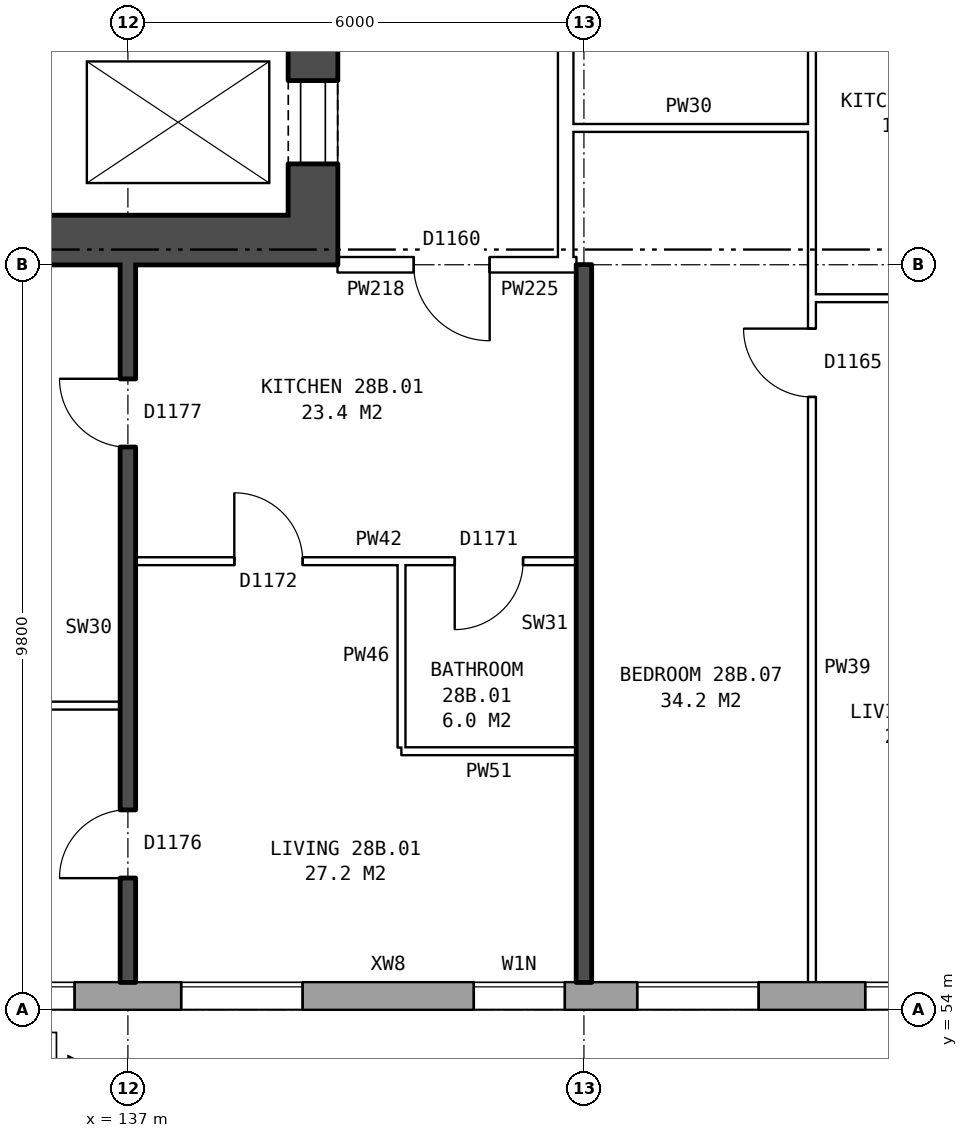
"""IFC4 building model, lengths in metres.
Left out: names, types, materials, properties, quantities, classifications, styles, units other than length and angle.
Written with IfcOpenShell. Run it as: python <this file> out.ifc"""

import sys

from ifc_helpers import new_model, si_unit, direction, frame, frame_2d, origin, place, context, subcontext, project, spatial, rectangle, extrude, element, fill, save


model = new_model("IFC4")
c1 = context("Model", 3, precision=1e-05, world=origin(), true_north=direction((0.0, 1.0)))
c2 = subcontext(c1, "Body", "Model", "MODEL_VIEW")
j1 = project(units=[si_unit("LENGTHUNIT", "METRE"), si_unit("PLANEANGLEUNIT", "RADIAN")], contexts=[c1])
p1 = place(None, origin())
s1 = spatial("IfcSite", under=j1, at=p1, CompositionType="ELEMENT")
p2 = place(p1, origin())
s2 = spatial("IfcBuilding", under=s1, at=p2, CompositionType="ELEMENT")
p3 = place(p2, frame((0.0, 0.0, 102.6)))
s3 = spatial("IfcBuildingStorey", under=s2, at=p3, CompositionType="ELEMENT", Elevation=102.6)
p4 = place(p3, frame((134.075, 54.18, 0.0), z_axis=(0.0, 0.0, 1.0), x_axis=(1.0, 0.0, 0.0)))
e1 = element("IfcWall", 1, at=p4, inside=s3, PredefinedType="STANDARD", context=c2, shape_type="SweptSolid", body=[
    extrude(rectangle(XDim=36.851, YDim=0.36, at=frame_2d((18.425, 0.0))), origin(), (0.0, 0.0, 1.0), 2.85),
])
p5 = place(p4, frame((0.625, 0.0, 0.8)))
e2 = element("IfcOpeningElement", 2, at=p5, cuts=e1, PredefinedType="OPENING", context=c2, shape_type="SweptSolid", body=[
    extrude(rectangle(XDim=1.6, YDim=1.8, at=frame_2d((0.8, 0.9))), frame((0.0, 0.19, 0.0), z_axis=(0.0, -1.0, 0.0), x_axis=(1.0, 0.0, 0.0)), (0.0, 0.0, 1.0), 0.38),
])
p6 = place(p4, frame((3.625, 0.0, 0.8)))
e3 = element("IfcOpeningElement", 3, at=p6, cuts=e1, PredefinedType="OPENING", context=c2, shape_type="SweptSolid", body=[
    extrude(rectangle(XDim=1.6, YDim=1.8, at=frame_2d((0.8, 0.9))), frame((0.0, 0.19, 0.0), z_axis=(0.0, -1.0, 0.0), x_axis=(1.0, 0.0, 0.0)), (0.0, 0.0, 1.0), 0.38),
])
p7 = place(p4, frame((7.475, 0.0, 0.8)))
e4 = element("IfcOpeningElement", 4, at=p7, cuts=e1, PredefinedType="OPENING", context=c2, shape_type="SweptSolid", body=[
    extrude(rectangle(XDim=1.2, YDim=1.2, at=frame_2d((0.6, 0.6))), frame((0.0, 0.19, 0.0), z_axis=(0.0, -1.0, 0.0), x_axis=(1.0, 0.0, 0.0)), (0.0, 0.0, 1.0), 0.38),
])
p8 = place(p4, frame((9.625, 0.0, 0.8)))
e5 = element("IfcOpeningElement", 5, at=p8, cuts=e1, PredefinedType="OPENING", context=c2, shape_type="SweptSolid", body=[
    extrude(rectangle(XDim=1.6, YDim=1.8, at=frame_2d((0.8, 0.9))), frame((0.0, 0.19, 0.0), z_axis=(0.0, -1.0, 0.0), x_axis=(1.0, 0.0, 0.0)), (0.0, 0.0, 1.0), 0.38),
])
p9 = place(p4, frame((12.625, 0.0, 0.8)))
e6 = element("IfcOpeningElement", 6, at=p9, cuts=e1, PredefinedType="OPENING", context=c2, shape_type="SweptSolid", body=[
    extrude(rectangle(XDim=1.6, YDim=1.8, at=frame_2d((0.8, 0.9))), frame((0.0, 0.19, 0.0), z_axis=(0.0, -1.0, 0.0), x_axis=(1.0, 0.0, 0.0)), (0.0, 0.0, 1.0), 0.38),
])
p10 = place(p4, frame((15.625, 0.0, 0.8)))
e7 = element("IfcOpeningElement", 7, at=p10, cuts=e1, PredefinedType="OPENING", context=c2, shape_type="SweptSolid", body=[
    extrude(rectangle(XDim=1.6, YDim=1.8, at=frame_2d((0.8, 0.9))), frame((0.0, 0.19, 0.0), z_axis=(0.0, -1.0, 0.0), x_axis=(1.0, 0.0, 0.0)), (0.0, 0.0, 1.0), 0.38),
])
p11 = place(p4, frame((18.625, 0.0, 0.8)))
e8 = element("IfcOpeningElement", 8, at=p11, cuts=e1, PredefinedType="OPENING", context=c2, shape_type="SweptSolid", body=[
    extrude(rectangle(XDim=1.6, YDim=1.8, at=frame_2d((0.8, 0.9))), frame((0.0, 0.19, 0.0), z_axis=(0.0, -1.0, 0.0), x_axis=(1.0, 0.0, 0.0)), (0.0, 0.0, 1.0), 0.38),
])
p12 = place(p4, frame((21.625, 0.0, 0.8)))
e9 = element("IfcOpeningElement", 9, at=p12, cuts=e1, PredefinedType="OPENING", context=c2, shape_type="SweptSolid", body=[
    extrude(rectangle(XDim=1.6, YDim=1.8, at=frame_2d((0.8, 0.9))), frame((0.0, 0.19, 0.0), z_axis=(0.0, -1.0, 0.0), x_axis=(1.0, 0.0, 0.0)), (0.0, 0.0, 1.0), 0.38),
])
p13 = place(p4, frame((24.625, 0.0, 0.8)))
e10 = element("IfcOpeningElement", 10, at=p13, cuts=e1, PredefinedType="OPENING", context=c2, shape_type="SweptSolid", body=[
    extrude(rectangle(XDim=1.6, YDim=1.8, at=frame_2d((0.8, 0.9))), frame((0.0, 0.19, 0.0), z_axis=(0.0, -1.0, 0.0), x_axis=(1.0, 0.0, 0.0)), (0.0, 0.0, 1.0), 0.38),
])
p14 = place(p4, frame((27.125, 0.0, 0.8)))
e11 = element("IfcOpeningElement", 11, at=p14, cuts=e1, PredefinedType="OPENING", context=c2, shape_type="SweptSolid", body=[
    extrude(rectangle(XDim=1.4, YDim=1.8, at=frame_2d((0.7, 0.9))), frame((0.0, 0.19, 0.0), z_axis=(0.0, -1.0, 0.0), x_axis=(1.0, 0.0, 0.0)), (0.0, 0.0, 1.0), 0.38),
])
p15 = place(p4, frame((28.825, 0.0, 0.8)))
e12 = element("IfcOpeningElement", 12, at=p15, cuts=e1, PredefinedType="OPENING", context=c2, shape_type="SweptSolid", body=[
    extrude(rectangle(XDim=0.8, YDim=0.9, at=frame_2d((0.4, 0.45))), frame((0.0, 0.19, 0.0), z_axis=(0.0, -1.0, 0.0), x_axis=(1.0, 0.0, 0.0)), (0.0, 0.0, 1.0), 0.38),
])
p16 = place(p4, frame((33.625, 0.0, 0.8)))
e13 = element("IfcOpeningElement", 13, at=p16, cuts=e1, PredefinedType="OPENING", context=c2, shape_type="SweptSolid", body=[
    extrude(rectangle(XDim=1.6, YDim=1.8, at=frame_2d((0.8, 0.9))), frame((0.0, 0.19, 0.0), z_axis=(0.0, -1.0, 0.0), x_axis=(1.0, 0.0, 0.0)), (0.0, 0.0, 1.0), 0.38),
])
p17 = place(p4, frame((30.825, 0.0, 1.7)))
e14 = element("IfcOpeningElement", 14, at=p17, cuts=e1, PredefinedType="OPENING", context=c2, shape_type="SweptSolid", body=[
    extrude(rectangle(XDim=0.8, YDim=0.9, at=frame_2d((0.4, 0.45))), frame((0.0, 0.19, 0.0), z_axis=(0.0, -1.0, 0.0), x_axis=(1.0, 0.0, 0.0)), (0.0, 0.0, 1.0), 0.38),
])
p18 = place(p4, frame((31.925, 0.0, 0.8)))
e15 = element("IfcOpeningElement", 15, at=p18, cuts=e1, PredefinedType="OPENING", context=c2, shape_type="SweptSolid", body=[
    extrude(rectangle(XDim=0.8, YDim=1.8, at=frame_2d((0.4, 0.9))), frame((0.0, 0.19, 0.0), z_axis=(0.0, -1.0, 0.0), x_axis=(1.0, 0.0, 0.0)), (0.0, 0.0, 1.0), 0.38),
])
p19 = place(p3, frame((139.435, 64.45, 0.0), z_axis=(0.0, 0.0, 1.0), x_axis=(0.0, 1.0, 0.0)))
e16 = element("IfcWall", 16, at=p19, inside=s3, PredefinedType="SHEAR", context=c2, shape_type="SweptSolid", body=[
    extrude(rectangle(XDim=11.1, YDim=0.65, at=frame_2d((5.55, 0.0))), origin(), (0.0, 0.0, 1.0), 2.85),
])
p20 = place(p19, frame((0.675, 0.0, 0.0)))
e17 = element("IfcOpeningElement", 17, at=p20, cuts=e16, PredefinedType="OPENING", context=c2, shape_type="SweptSolid", body=[
    extrude(rectangle(XDim=1.1, YDim=2.1, at=frame_2d((0.55, 1.05))), frame((0.0, 0.335, 0.0), z_axis=(0.0, -1.0, 0.0), x_axis=(1.0, 0.0, 0.0)), (0.0, 0.0, 1.0), 0.67),
])
p21 = place(p19, frame((9.25, 0.0, 0.0)))
e18 = element("IfcOpeningElement", 18, at=p21, cuts=e16, PredefinedType="OPENING", context=c2, shape_type="SweptSolid", body=[
    extrude(rectangle(XDim=1.1, YDim=2.1, at=frame_2d((0.55, 1.05))), frame((0.0, 0.335, 0.0), z_axis=(0.0, -1.0, 0.0), x_axis=(1.0, 0.0, 0.0)), (0.0, 0.0, 1.0), 0.67),
])
p22 = place(p19, frame((7.475, 0.0, 0.0)))
e19 = element("IfcOpeningElement", 19, at=p22, cuts=e16, PredefinedType="OPENING", context=c2, shape_type="SweptSolid", body=[
    extrude(rectangle(XDim=0.85, YDim=2.1, at=frame_2d((0.425, 1.05))), frame((0.0, 0.335, 0.0), z_axis=(0.0, -1.0, 0.0), x_axis=(1.0, 0.0, 0.0)), (0.0, 0.0, 1.0), 0.67),
])
p23 = place(p3, frame((139.76, 64.125, 0.0), z_axis=(0.0, 0.0, 1.0), x_axis=(-1.0, 0.0, 0.0)))
e20 = element("IfcWall", 20, at=p23, inside=s3, PredefinedType="SHEAR", context=c2, shape_type="SweptSolid", body=[
    extrude(rectangle(XDim=8.4, YDim=0.65, at=frame_2d((4.2, 0.0))), origin(), (0.0, 0.0, 1.0), 2.85),
])
p24 = place(p3, frame((142.76, 63.9, 0.0), z_axis=(0.0, 0.0, 1.0), x_axis=(0.0, 1.0, 0.0)))
e21 = element("IfcWall", 21, at=p24, inside=s3, PredefinedType="PARTITIONING", context=c2, shape_type="SweptSolid", body=[
    extrude(rectangle(XDim=12.2, YDim=0.2, at=frame_2d((6.1, 0.0))), origin(), (0.0, 0.0, 1.0), 2.85),
])
p25 = place(p24, frame((5.1, 0.0, 0.0)))
e22 = element("IfcOpeningElement", 22, at=p25, cuts=e21, PredefinedType="OPENING", context=c2, shape_type="SweptSolid", body=[
    extrude(rectangle(XDim=2.0, YDim=2.1, at=frame_2d((1.0, 1.05))), frame((0.0, 0.11, 0.0), z_axis=(0.0, -1.0, 0.0), x_axis=(1.0, 0.0, 0.0)), (0.0, 0.0, 1.0), 0.22),
])
p26 = place(p3, frame((140.6, 57.4, 0.0), z_axis=(0.0, 0.0, 1.0), x_axis=(1.0, 0.0, 0.0)))
e23 = element("IfcWall", 23, at=p26, inside=s3, PredefinedType="PARTITIONING", context=c2, shape_type="SweptSolid", body=[
    extrude(rectangle(XDim=2.3, YDim=0.1, at=frame_2d((1.15, 0.0))), origin(), (0.0, 0.0, 1.0), 2.85),
])
p27 = place(p3, frame((131.36, 58.0, 0.0), z_axis=(0.0, 0.0, 1.0), x_axis=(1.0, 0.0, 0.0)))
e24 = element("IfcWall", 24, at=p27, inside=s3, PredefinedType="PARTITIONING", context=c2, shape_type="SweptSolid", body=[
    extrude(rectangle(XDim=5.54, YDim=0.1, at=frame_2d((2.77, 0.0))), origin(), (0.0, 0.0, 1.0), 2.85),
])
p28 = place(p3, frame((137.1, 59.9, 0.0), z_axis=(0.0, 0.0, 1.0), x_axis=(1.0, 0.0, 0.0)))
e25 = element("IfcWall", 25, at=p28, inside=s3, PredefinedType="PARTITIONING", context=c2, shape_type="SweptSolid", body=[
    extrude(rectangle(XDim=5.8, YDim=0.1, at=frame_2d((2.9, 0.0))), origin(), (0.0, 0.0, 1.0), 2.85),
])
p29 = place(p28, frame((1.3, 0.0, 0.0)))
e26 = element("IfcOpeningElement", 26, at=p29, cuts=e25, PredefinedType="OPENING", context=c2, shape_type="SweptSolid", body=[
    extrude(rectangle(XDim=0.9, YDim=2.1, at=frame_2d((0.45, 1.05))), frame((0.0, 0.06, 0.0), z_axis=(0.0, -1.0, 0.0), x_axis=(1.0, 0.0, 0.0)), (0.0, 0.0, 1.0), 0.12),
])
p30 = place(p28, frame((4.2, 0.0, 0.0)))
e27 = element("IfcOpeningElement", 27, at=p30, cuts=e25, PredefinedType="OPENING", context=c2, shape_type="SweptSolid", body=[
    extrude(rectangle(XDim=0.9, YDim=2.1, at=frame_2d((0.45, 1.05))), frame((0.0, 0.06, 0.0), z_axis=(0.0, -1.0, 0.0), x_axis=(1.0, 0.0, 0.0)), (0.0, 0.0, 1.0), 0.12),
])
p31 = place(p3, frame((146.0, 63.36, 0.0), z_axis=(0.0, 0.0, 1.0), x_axis=(1.0, 0.0, 0.0)))
e28 = element("IfcWall", 28, at=p31, inside=s3, PredefinedType="PARTITIONING", context=c2, shape_type="SweptSolid", body=[
    extrude(rectangle(XDim=6.0, YDim=0.1, at=frame_2d((3.0, 0.0))), origin(), (0.0, 0.0, 1.0), 2.85),
])
p32 = place(p31, frame((1.05, 0.0, 0.0)))
e29 = element("IfcOpeningElement", 29, at=p32, cuts=e28, PredefinedType="OPENING", context=c2, shape_type="SweptSolid", body=[
    extrude(rectangle(XDim=0.9, YDim=2.1, at=frame_2d((0.45, 1.05))), frame((0.0, 0.06, 0.0), z_axis=(0.0, -1.0, 0.0), x_axis=(1.0, 0.0, 0.0)), (0.0, 0.0, 1.0), 0.12),
])
p33 = place(p31, frame((4.05, 0.0, 0.0)))
e30 = element("IfcOpeningElement", 30, at=p33, cuts=e28, PredefinedType="OPENING", context=c2, shape_type="SweptSolid", body=[
    extrude(rectangle(XDim=0.9, YDim=2.1, at=frame_2d((0.45, 1.05))), frame((0.0, 0.06, 0.0), z_axis=(0.0, -1.0, 0.0), x_axis=(1.0, 0.0, 0.0)), (0.0, 0.0, 1.0), 0.12),
])
p34 = place(p3, frame((139.76, 63.8, 0.0), z_axis=(0.0, 0.0, 1.0), x_axis=(1.0, 0.0, 0.0)))
e31 = element("IfcWall", 31, at=p34, inside=s3, PredefinedType="PARTITIONING", context=c2, shape_type="SweptSolid", body=[
    extrude(rectangle(XDim=3.0, YDim=0.2, at=frame_2d((1.5, 0.0))), origin(), (0.0, 0.0, 1.0), 2.85),
])
p35 = place(p34, frame((1.0, 0.0, 0.0)))
e32 = element("IfcOpeningElement", 32, at=p35, cuts=e31, PredefinedType="OPENING", context=c2, shape_type="SweptSolid", body=[
    extrude(rectangle(XDim=1.0, YDim=2.1, at=frame_2d((0.5, 1.05))), frame((0.0, 0.11, 0.0), z_axis=(0.0, -1.0, 0.0), x_axis=(1.0, 0.0, 0.0)), (0.0, 0.0, 1.0), 0.22),
])
p36 = place(p3, frame((142.76, 63.8, 0.0), z_axis=(0.0, 0.0, 1.0), x_axis=(1.0, 0.0, 0.0)))
e33 = element("IfcWall", 33, at=p36, inside=s3, PredefinedType="PARTITIONING", context=c2, shape_type="SweptSolid", body=[
    extrude(rectangle(XDim=0.14, YDim=0.2, at=frame_2d((0.07, 0.0))), origin(), (0.0, 0.0, 1.0), 2.85),
])
p37 = place(p3, frame((142.76, 65.6, 0.0), z_axis=(0.0, 0.0, 1.0), x_axis=(1.0, 0.0, 0.0)))
e34 = element("IfcWall", 34, at=p37, inside=s3, PredefinedType="PARTITIONING", context=c2, shape_type="SweptSolid", body=[
    extrude(rectangle(XDim=3.24, YDim=0.1, at=frame_2d((1.62, 0.0))), origin(), (0.0, 0.0, 1.0), 2.85),
])
p38 = place(p3, frame((137.0, 54.36, 0.0), z_axis=(0.0, 0.0, 1.0), x_axis=(0.0, 1.0, 0.0)))
e35 = element("IfcWall", 35, at=p38, inside=s3, PredefinedType="SOLIDWALL", context=c2, shape_type="SweptSolid", body=[
    extrude(rectangle(XDim=9.44, YDim=0.2, at=frame_2d((4.72, 0.0))), origin(), (0.0, 0.0, 1.0), 2.85),
])
p39 = place(p38, frame((1.37, 0.0, 0.0)))
e36 = element("IfcOpeningElement", 36, at=p39, cuts=e35, PredefinedType="OPENING", context=c2, shape_type="SweptSolid", body=[
    extrude(rectangle(XDim=0.9, YDim=2.1, at=frame_2d((0.45, 1.05))), frame((0.0, 0.11, 0.0), z_axis=(0.0, -1.0, 0.0), x_axis=(1.0, 0.0, 0.0)), (0.0, 0.0, 1.0), 0.22),
])
p40 = place(p38, frame((7.04, 0.0, 0.0)))
e37 = element("IfcOpeningElement", 37, at=p40, cuts=e35, PredefinedType="OPENING", context=c2, shape_type="SweptSolid", body=[
    extrude(rectangle(XDim=0.9, YDim=2.1, at=frame_2d((0.45, 1.05))), frame((0.0, 0.11, 0.0), z_axis=(0.0, -1.0, 0.0), x_axis=(1.0, 0.0, 0.0)), (0.0, 0.0, 1.0), 0.22),
])
p41 = place(p3, frame((140.6, 57.45, 0.0), z_axis=(0.0, 0.0, 1.0), x_axis=(0.0, 1.0, 0.0)))
e38 = element("IfcWall", 38, at=p41, inside=s3, PredefinedType="PARTITIONING", context=c2, shape_type="SweptSolid", body=[
    extrude(rectangle(XDim=2.4, YDim=0.1, at=frame_2d((1.2, 0.0))), origin(), (0.0, 0.0, 1.0), 2.85),
])
p42 = place(p3, frame((143.0, 54.36, 0.0), z_axis=(0.0, 0.0, 1.0), x_axis=(0.0, 1.0, 0.0)))
e39 = element("IfcWall", 39, at=p42, inside=s3, PredefinedType="SOLIDWALL", context=c2, shape_type="SweptSolid", body=[
    extrude(rectangle(XDim=9.44, YDim=0.2, at=frame_2d((4.72, 0.0))), origin(), (0.0, 0.0, 1.0), 2.85),
])
p43 = place(p3, frame((146.0, 54.36, 0.0), z_axis=(0.0, 0.0, 1.0), x_axis=(0.0, 1.0, 0.0)))
e40 = element("IfcWall", 40, at=p43, inside=s3, PredefinedType="PARTITIONING", context=c2, shape_type="SweptSolid", body=[
    extrude(rectangle(XDim=14.34, YDim=0.1, at=frame_2d((7.17, 0.0))), origin(), (0.0, 0.0, 1.0), 2.85),
])
p44 = place(p43, frame((7.7, 0.0, 0.0)))
e41 = element("IfcOpeningElement", 41, at=p44, cuts=e40, PredefinedType="OPENING", context=c2, shape_type="SweptSolid", body=[
    extrude(rectangle(XDim=0.9, YDim=2.1, at=frame_2d((0.45, 1.05))), frame((0.0, 0.06, 0.0), z_axis=(0.0, -1.0, 0.0), x_axis=(1.0, 0.0, 0.0)), (0.0, 0.0, 1.0), 0.12),
])
p45 = place(p43, frame((13.04, 0.0, 0.0)))
e42 = element("IfcOpeningElement", 42, at=p45, cuts=e40, PredefinedType="OPENING", context=c2, shape_type="SweptSolid", body=[
    extrude(rectangle(XDim=0.9, YDim=2.1, at=frame_2d((0.45, 1.05))), frame((0.0, 0.06, 0.0), z_axis=(0.0, -1.0, 0.0), x_axis=(1.0, 0.0, 0.0)), (0.0, 0.0, 1.0), 0.12),
])
p46 = place(p5, origin())
e43 = element("IfcWindow", 43, at=p46, inside=s3, PartitioningType="SINGLE_PANEL", PredefinedType="WINDOW", context=c2, shape_type="SweptSolid", body=[
    extrude(rectangle(XDim=1.6, YDim=1.8, at=frame_2d((0.8, 0.9))), frame((0.0, 0.15, 0.0), z_axis=(0.0, -1.0, 0.0), x_axis=(1.0, 0.0, 0.0)), (0.0, 0.0, 1.0), 0.06),
])
fill(e2, e43)
p47 = place(p6, origin())
e44 = element("IfcWindow", 44, at=p47, inside=s3, PartitioningType="SINGLE_PANEL", PredefinedType="WINDOW", context=c2, shape_type="SweptSolid", body=[
    extrude(rectangle(XDim=1.6, YDim=1.8, at=frame_2d((0.8, 0.9))), frame((0.0, 0.15, 0.0), z_axis=(0.0, -1.0, 0.0), x_axis=(1.0, 0.0, 0.0)), (0.0, 0.0, 1.0), 0.06),
])
fill(e3, e44)
p48 = place(p7, origin())
e45 = element("IfcWindow", 45, at=p48, inside=s3, PartitioningType="SINGLE_PANEL", PredefinedType="WINDOW", context=c2, shape_type="SweptSolid", body=[
    extrude(rectangle(XDim=1.2, YDim=1.2, at=frame_2d((0.6, 0.6))), frame((0.0, 0.15, 0.0), z_axis=(0.0, -1.0, 0.0), x_axis=(1.0, 0.0, 0.0)), (0.0, 0.0, 1.0), 0.06),
])
fill(e4, e45)
p49 = place(p8, origin())
e46 = element("IfcWindow", 46, at=p49, inside=s3, PartitioningType="SINGLE_PANEL", PredefinedType="WINDOW", context=c2, shape_type="SweptSolid", body=[
    extrude(rectangle(XDim=1.6, YDim=1.8, at=frame_2d((0.8, 0.9))), frame((0.0, 0.15, 0.0), z_axis=(0.0, -1.0, 0.0), x_axis=(1.0, 0.0, 0.0)), (0.0, 0.0, 1.0), 0.06),
])
fill(e5, e46)
p50 = place(p9, origin())
e47 = element("IfcWindow", 47, at=p50, inside=s3, PartitioningType="SINGLE_PANEL", PredefinedType="WINDOW", context=c2, shape_type="SweptSolid", body=[
    extrude(rectangle(XDim=1.6, YDim=1.8, at=frame_2d((0.8, 0.9))), frame((0.0, 0.15, 0.0), z_axis=(0.0, -1.0, 0.0), x_axis=(1.0, 0.0, 0.0)), (0.0, 0.0, 1.0), 0.06),
])
fill(e6, e47)
p51 = place(p20, origin())
e48 = element("IfcDoor", 48, at=p51, inside=s3, OperationType="DOUBLE_DOOR_SLIDING", PredefinedType="DOOR", context=c2, shape_type="SweptSolid", body=[
    extrude(rectangle(XDim=1.1, YDim=2.1, at=frame_2d((0.55, 1.05))), frame((0.0, 0.31, 0.0), z_axis=(0.0, -1.0, 0.0), x_axis=(1.0, 0.0, 0.0)), (0.0, 0.0, 1.0), 0.05),
])
fill(e17, e48)
p52 = place(p39, origin())
e49 = element("IfcDoor", 49, at=p52, inside=s3, OperationType="SINGLE_SWING_LEFT", PredefinedType="DOOR", context=c2, shape_type="SweptSolid", body=[
    extrude(rectangle(XDim=0.9, YDim=2.1, at=frame_2d((0.45, 1.05))), frame((0.0, 0.025, 0.0), z_axis=(0.0, -1.0, 0.0), x_axis=(1.0, 0.0, 0.0)), (0.0, 0.0, 1.0), 0.05),
])
fill(e36, e49)
p53 = place(p40, origin())
e50 = element("IfcDoor", 50, at=p53, inside=s3, OperationType="SINGLE_SWING_RIGHT", PredefinedType="DOOR", context=c2, shape_type="SweptSolid", body=[
    extrude(rectangle(XDim=0.9, YDim=2.1, at=frame_2d((0.45, 1.05))), frame((0.0, 0.025, 0.0), z_axis=(0.0, -1.0, 0.0), x_axis=(1.0, 0.0, 0.0)), (0.0, 0.0, 1.0), 0.05),
])
fill(e37, e50)
p54 = place(p35, frame((1.0, 0.0, 0.0), z_axis=(0.0, 0.0, 1.0), x_axis=(-1.0, 0.0, 0.0)))
e51 = element("IfcDoor", 51, at=p54, inside=s3, OperationType="SINGLE_SWING_LEFT", PredefinedType="DOOR", context=c2, shape_type="SweptSolid", body=[
    extrude(rectangle(XDim=1.0, YDim=2.1, at=frame_2d((0.5, 1.05))), frame((0.0, 0.025, 0.0), z_axis=(0.0, -1.0, 0.0), x_axis=(1.0, 0.0, 0.0)), (0.0, 0.0, 1.0), 0.05),
])
fill(e32, e51)
p55 = place(p29, origin())
e52 = element("IfcDoor", 52, at=p55, inside=s3, OperationType="SINGLE_SWING_LEFT", PredefinedType="DOOR", context=c2, shape_type="SweptSolid", body=[
    extrude(rectangle(XDim=0.9, YDim=2.1, at=frame_2d((0.45, 1.05))), frame((0.0, 0.025, 0.0), z_axis=(0.0, -1.0, 0.0), x_axis=(1.0, 0.0, 0.0)), (0.0, 0.0, 1.0), 0.05),
])
fill(e26, e52)
p56 = place(p30, frame((0.9, 0.0, 0.0), z_axis=(0.0, 0.0, 1.0), x_axis=(-1.0, 0.0, 0.0)))
e53 = element("IfcDoor", 53, at=p56, inside=s3, OperationType="SINGLE_SWING_RIGHT", PredefinedType="DOOR", context=c2, shape_type="SweptSolid", body=[
    extrude(rectangle(XDim=0.9, YDim=2.1, at=frame_2d((0.45, 1.05))), frame((0.0, 0.025, 0.0), z_axis=(0.0, -1.0, 0.0), x_axis=(1.0, 0.0, 0.0)), (0.0, 0.0, 1.0), 0.05),
])
fill(e27, e53)
p57 = place(p44, origin())
e54 = element("IfcDoor", 54, at=p57, inside=s3, OperationType="SINGLE_SWING_RIGHT", PredefinedType="DOOR", context=c2, shape_type="SweptSolid", body=[
    extrude(rectangle(XDim=0.9, YDim=2.1, at=frame_2d((0.45, 1.05))), frame((0.0, 0.025, 0.0), z_axis=(0.0, -1.0, 0.0), x_axis=(1.0, 0.0, 0.0)), (0.0, 0.0, 1.0), 0.05),
])
fill(e41, e54)
save(model, sys.argv[1])
